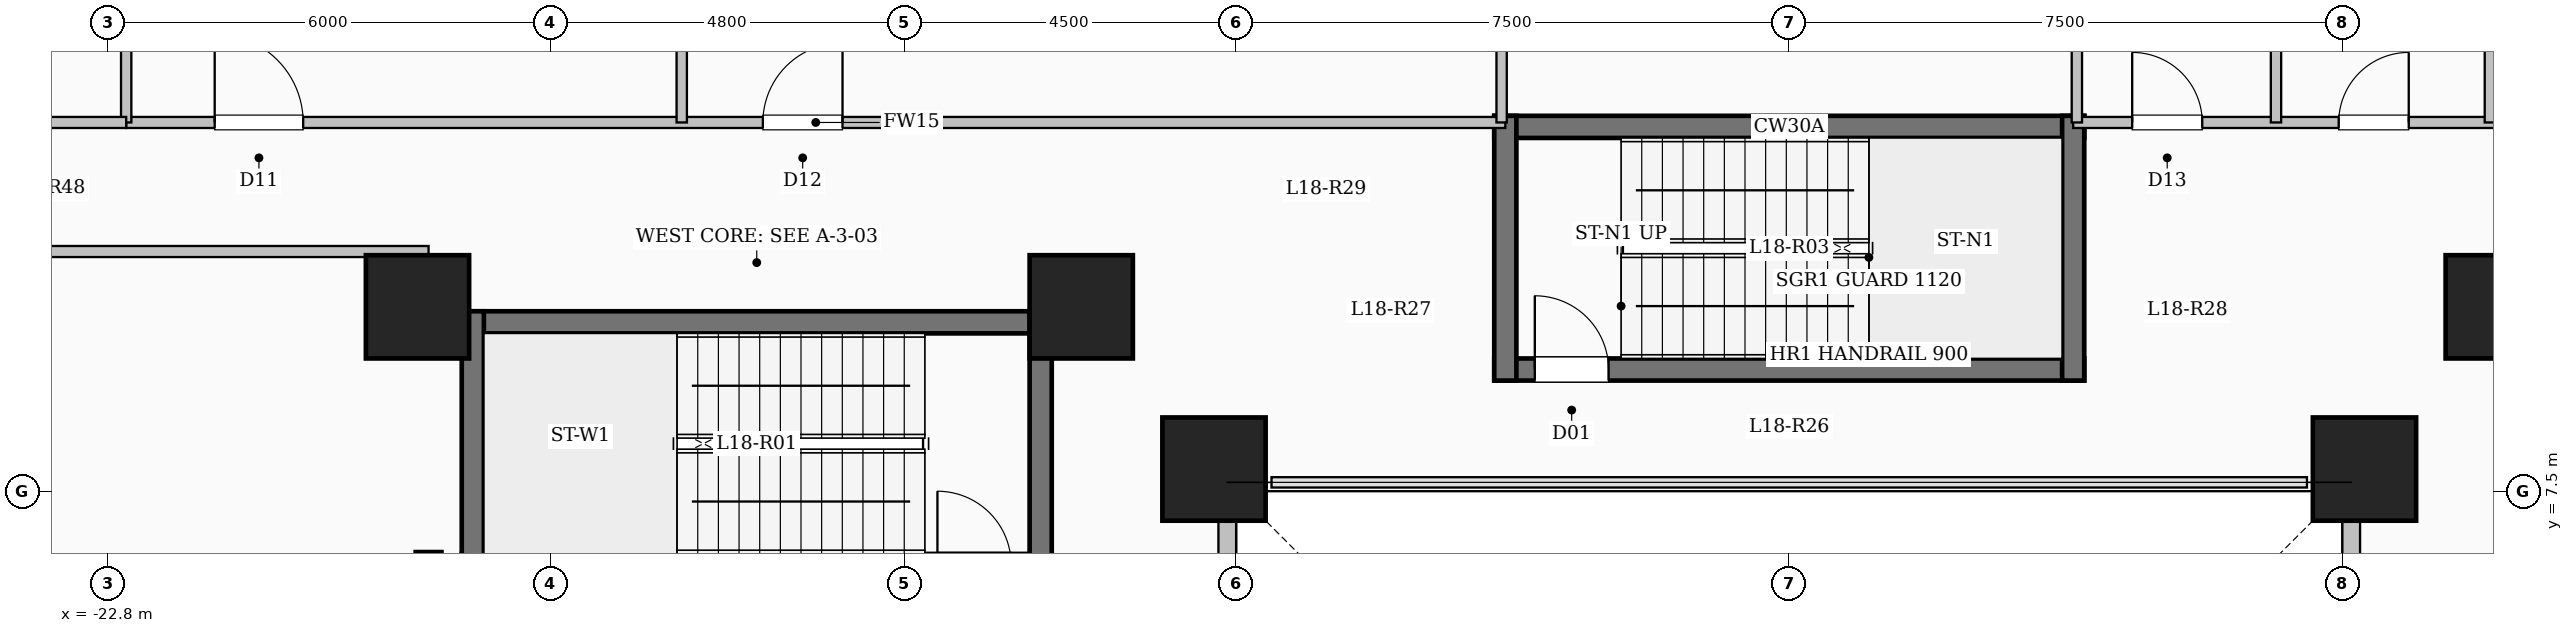
"""IFC4 building model, lengths in metres.
Left out: names, types, materials, properties, quantities, classifications, styles, units other than length and angle.
Written with IfcOpenShell. Run it as: python <this file> out.ifc"""

import sys

from ifc_helpers import new_model, si_unit, direction, frame, frame_2d, origin, origin_2d, place, context, subcontext, project, spatial, rectangle, extrude, element, fill, save


model = new_model("IFC4")
c1 = context("Model", 3, precision=1e-05, world=origin(), true_north=direction((0.0, 1.0)))
c2 = subcontext(c1, "Body", "Model", "MODEL_VIEW")
j1 = project(units=[si_unit("LENGTHUNIT", "METRE"), si_unit("PLANEANGLEUNIT", "RADIAN")], contexts=[c1])
p1 = place(None, origin())
s1 = spatial("IfcSite", under=j1, at=p1, CompositionType="ELEMENT")
p2 = place(p1, origin())
s2 = spatial("IfcBuilding", under=s1, at=p2, CompositionType="ELEMENT")
p3 = place(p2, frame((0.0, 0.0, 68.7)))
s3 = spatial("IfcBuildingStorey", under=s2, at=p3, CompositionType="ELEMENT", Elevation=68.7)
for number, where, z_axis, x_axis in (
    (1, (-7.8, 7.8, 0.0), (0.0, 0.0, 1.0), (1.0, 0.0, 0.0)),
    (2, (7.8, 7.8, 0.0), (0.0, 0.0, 1.0), (1.0, 0.0, 0.0)),
    (3, (-9.6, 10.0, 0.0), (0.0, 0.0, 1.0), (1.0, 0.0, 0.0)),
    (4, (9.6, 10.0, 0.0), (0.0, 0.0, 1.0), (1.0, 0.0, 0.0)),
    (5, (-18.6, 10.0, 0.0), (0.0, 0.0, 1.0), (1.0, 0.0, 0.0)),
):
    element("IfcColumn", number, at=place(p3, frame(where, z_axis=z_axis, x_axis=x_axis)), inside=s3, PredefinedType="COLUMN", context=c2, shape_type="SweptSolid", body=[
        extrude(rectangle(XDim=1.4, YDim=1.4, at=origin_2d()), origin(), (0.0, 0.0, 1.0), 4.5),
    ])
p4 = place(p3, frame((7.62, -7.62, 0.0), z_axis=(0.0, 0.0, 1.0), x_axis=(0.0, 1.0, 0.0)))
e6 = element("IfcWall", 6, at=p4, inside=s3, PredefinedType="SOLIDWALL", context=c2, shape_type="SweptSolid", body=[
    extrude(rectangle(XDim=15.24, YDim=0.24, at=frame_2d((7.62, 0.0))), origin(), (0.0, 0.0, 1.0), 4.2),
])
p5 = place(p4, frame((6.92, 0.0, 0.95)))
e7 = element("IfcOpeningElement", 7, at=p5, cuts=e6, PredefinedType="OPENING", context=c2, shape_type="SweptSolid", body=[
    extrude(rectangle(XDim=1.4, YDim=1.5, at=frame_2d((0.7, 0.75))), frame((0.0, 0.13, 0.0), z_axis=(0.0, -1.0, 0.0), x_axis=(1.0, 0.0, 0.0)), (0.0, 0.0, 1.0), 0.26),
])
p6 = place(p3, frame((-7.62, 7.62, 0.0), z_axis=(0.0, 0.0, 1.0), x_axis=(0.0, -1.0, 0.0)))
e8 = element("IfcWall", 8, at=p6, inside=s3, PredefinedType="SOLIDWALL", context=c2, shape_type="SweptSolid", body=[
    extrude(rectangle(XDim=15.24, YDim=0.24, at=frame_2d((7.62, 0.0))), origin(), (0.0, 0.0, 1.0), 4.2),
])
p7 = place(p6, frame((6.92, 0.0, 0.95)))
e9 = element("IfcOpeningElement", 9, at=p7, cuts=e8, PredefinedType="OPENING", context=c2, shape_type="SweptSolid", body=[
    extrude(rectangle(XDim=1.4, YDim=1.5, at=frame_2d((0.7, 0.75))), frame((0.0, 0.13, 0.0), z_axis=(0.0, -1.0, 0.0), x_axis=(1.0, 0.0, 0.0)), (0.0, 0.0, 1.0), 0.26),
])
p8 = place(p3, frame((-18.0, 9.79, 0.0), z_axis=(0.0, 0.0, 1.0), x_axis=(1.0, 0.0, 0.0)))
e10 = element("IfcWall", 10, at=p8, inside=s3, PredefinedType="SHEAR", context=c2, shape_type="SweptSolid", body=[
    extrude(rectangle(XDim=8.0, YDim=0.3, at=frame_2d((4.0, 0.0))), origin(), (0.0, 0.0, 1.0), 4.5),
])
p9 = place(p3, frame((-18.0, 6.5, 0.0), z_axis=(0.0, 0.0, 1.0), x_axis=(1.0, 0.0, 0.0)))
e11 = element("IfcWall", 11, at=p9, inside=s3, PredefinedType="SHEAR", context=c2, shape_type="SweptSolid", body=[
    extrude(rectangle(XDim=8.0, YDim=0.3, at=frame_2d((4.0, 0.0))), origin(), (0.0, 0.0, 1.0), 4.5),
])
p10 = place(p9, frame((6.45, 0.0, 0.0)))
e12 = element("IfcOpeningElement", 12, at=p10, cuts=e11, PredefinedType="OPENING", context=c2, shape_type="SweptSolid", body=[
    extrude(rectangle(XDim=1.0, YDim=2.15, at=frame_2d((0.5, 1.075))), frame((0.0, 0.16, 0.0), z_axis=(0.0, -1.0, 0.0), x_axis=(1.0, 0.0, 0.0)), (0.0, 0.0, 1.0), 0.32),
])
for number, where, z_axis, x_axis in (
    (13, (-17.85, 6.35, 0.0), (0.0, 0.0, 1.0), (0.0, 1.0, 0.0)),
    (14, (-10.15, 6.35, 0.0), (0.0, 0.0, 1.0), (0.0, 1.0, 0.0)),
):
    element("IfcWall", number, at=place(p3, frame(where, z_axis=z_axis, x_axis=x_axis)), inside=s3, PredefinedType="SHEAR", context=c2, shape_type="SweptSolid", body=[
        extrude(rectangle(XDim=3.59, YDim=0.3, at=frame_2d((1.795, 0.0))), origin(), (0.0, 0.0, 1.0), 4.5),
    ])
p11 = place(p3, frame((-4.0, 12.44, 0.0), z_axis=(0.0, 0.0, 1.0), x_axis=(1.0, 0.0, 0.0)))
e15 = element("IfcWall", 15, at=p11, inside=s3, PredefinedType="SHEAR", context=c2, shape_type="SweptSolid", body=[
    extrude(rectangle(XDim=8.0, YDim=0.3, at=frame_2d((4.0, 0.0))), origin(), (0.0, 0.0, 1.0), 4.5),
])
p12 = place(p3, frame((-4.0, 9.15, 0.0), z_axis=(0.0, 0.0, 1.0), x_axis=(1.0, 0.0, 0.0)))
e16 = element("IfcWall", 16, at=p12, inside=s3, PredefinedType="SHEAR", context=c2, shape_type="SweptSolid", body=[
    extrude(rectangle(XDim=8.0, YDim=0.3, at=frame_2d((4.0, 0.0))), origin(), (0.0, 0.0, 1.0), 4.5),
])
p13 = place(p12, frame((0.55, 0.0, 0.0)))
e17 = element("IfcOpeningElement", 17, at=p13, cuts=e16, PredefinedType="OPENING", context=c2, shape_type="SweptSolid", body=[
    extrude(rectangle(XDim=1.0, YDim=2.15, at=frame_2d((0.5, 1.075))), frame((0.0, 0.16, 0.0), z_axis=(0.0, -1.0, 0.0), x_axis=(1.0, 0.0, 0.0)), (0.0, 0.0, 1.0), 0.32),
])
for number, where, z_axis, x_axis in (
    (18, (-3.85, 9.0, 0.0), (0.0, 0.0, 1.0), (0.0, 1.0, 0.0)),
    (19, (3.85, 9.0, 0.0), (0.0, 0.0, 1.0), (0.0, 1.0, 0.0)),
):
    element("IfcWall", number, at=place(p3, frame(where, z_axis=z_axis, x_axis=x_axis)), inside=s3, PredefinedType="SHEAR", context=c2, shape_type="SweptSolid", body=[
        extrude(rectangle(XDim=3.59, YDim=0.3, at=frame_2d((1.795, 0.0))), origin(), (0.0, 0.0, 1.0), 4.5),
    ])
p14 = place(p3, frame((-18.45, -7.375, 0.0), z_axis=(0.0, 0.0, 1.0), x_axis=(0.0, 1.0, 0.0)))
e20 = element("IfcWall", 20, at=p14, inside=s3, PredefinedType="SHEAR", context=c2, shape_type="SweptSolid", body=[
    extrude(rectangle(XDim=14.05, YDim=0.35, at=frame_2d((7.025, 0.0))), origin(), (0.0, 0.0, 1.0), 4.5),
])
p15 = place(p3, frame((-22.55, 12.5, 0.0), z_axis=(0.0, 0.0, 1.0), x_axis=(1.0, 0.0, 0.0)))
e21 = element("IfcWall", 21, at=p15, inside=s3, PredefinedType="PARTITIONING", context=c2, shape_type="SweptSolid", body=[
    extrude(rectangle(XDim=18.7, YDim=0.15, at=frame_2d((9.35, 0.0))), origin(), (0.0, 0.0, 1.0), 4.2),
])
p16 = place(p15, frame((1.2, 0.0, 0.0)))
e22 = element("IfcOpeningElement", 22, at=p16, cuts=e21, PredefinedType="OPENING", context=c2, shape_type="SweptSolid", body=[
    extrude(rectangle(XDim=1.2, YDim=2.15, at=frame_2d((0.6, 1.075))), frame((0.0, 0.085, 0.0), z_axis=(0.0, -1.0, 0.0), x_axis=(1.0, 0.0, 0.0)), (0.0, 0.0, 1.0), 0.17),
])
p17 = place(p15, frame((8.633, 0.0, 0.0)))
e23 = element("IfcOpeningElement", 23, at=p17, cuts=e21, PredefinedType="OPENING", context=c2, shape_type="SweptSolid", body=[
    extrude(rectangle(XDim=1.08, YDim=2.15, at=frame_2d((0.54, 1.075))), frame((0.0, 0.085, 0.0), z_axis=(0.0, -1.0, 0.0), x_axis=(1.0, 0.0, 0.0)), (0.0, 0.0, 1.0), 0.17),
])
p18 = place(p3, frame((3.85, 12.5, 0.0), z_axis=(0.0, 0.0, 1.0), x_axis=(1.0, 0.0, 0.0)))
e24 = element("IfcWall", 24, at=p18, inside=s3, PredefinedType="PARTITIONING", context=c2, shape_type="SweptSolid", body=[
    extrude(rectangle(XDim=18.7, YDim=0.15, at=frame_2d((9.35, 0.0))), origin(), (0.0, 0.0, 1.0), 4.2),
])
p19 = place(p18, frame((0.8, 0.0, 0.0)))
e25 = element("IfcOpeningElement", 25, at=p19, cuts=e24, PredefinedType="OPENING", context=c2, shape_type="SweptSolid", body=[
    extrude(rectangle(XDim=0.95, YDim=2.15, at=frame_2d((0.475, 1.075))), frame((0.0, 0.085, 0.0), z_axis=(0.0, -1.0, 0.0), x_axis=(1.0, 0.0, 0.0)), (0.0, 0.0, 1.0), 0.17),
])
p20 = place(p18, frame((3.6, 0.0, 0.0)))
e26 = element("IfcOpeningElement", 26, at=p20, cuts=e24, PredefinedType="OPENING", context=c2, shape_type="SweptSolid", body=[
    extrude(rectangle(XDim=0.95, YDim=2.15, at=frame_2d((0.475, 1.075))), frame((0.0, 0.085, 0.0), z_axis=(0.0, -1.0, 0.0), x_axis=(1.0, 0.0, 0.0)), (0.0, 0.0, 1.0), 0.17),
])
p21 = place(p18, frame((6.55, 0.0, 0.0)))
e27 = element("IfcOpeningElement", 27, at=p21, cuts=e24, PredefinedType="OPENING", context=c2, shape_type="SweptSolid", body=[
    extrude(rectangle(XDim=1.08, YDim=2.15, at=frame_2d((0.54, 1.075))), frame((0.0, 0.085, 0.0), z_axis=(0.0, -1.0, 0.0), x_axis=(1.0, 0.0, 0.0)), (0.0, 0.0, 1.0), 0.17),
])
p22 = place(p18, frame((11.97, 0.0, 0.0)))
e28 = element("IfcOpeningElement", 28, at=p22, cuts=e24, PredefinedType="OPENING", context=c2, shape_type="SweptSolid", body=[
    extrude(rectangle(XDim=1.2, YDim=2.15, at=frame_2d((0.6, 1.075))), frame((0.0, 0.085, 0.0), z_axis=(0.0, -1.0, 0.0), x_axis=(1.0, 0.0, 0.0)), (0.0, 0.0, 1.0), 0.17),
])
for number, where, z_axis, x_axis in (
    (29, (-3.9, 12.5, 0.0), (0.0, 0.0, 1.0), (0.0, 1.0, 0.0)),
    (30, (3.9, 12.5, 0.0), (0.0, 0.0, 1.0), (0.0, 1.0, 0.0)),
):
    element("IfcWall", number, at=place(p3, frame(where, z_axis=z_axis, x_axis=x_axis)), inside=s3, PredefinedType="PARTITIONING", context=c2, shape_type="SweptSolid", body=[
        extrude(rectangle(XDim=12.58, YDim=0.14, at=frame_2d((6.29, 0.0))), origin(), (0.0, 0.0, 1.0), 4.2),
    ])
p23 = place(p3, frame((-15.017, 12.5, 0.0), z_axis=(0.0, 0.0, 1.0), x_axis=(0.0, 1.0, 0.0)))
e31 = element("IfcWall", 31, at=p23, inside=s3, PredefinedType="PARTITIONING", context=c2, shape_type="SweptSolid", body=[
    extrude(rectangle(XDim=11.1, YDim=0.14, at=frame_2d((5.55, 0.0))), origin(), (0.0, 0.0, 1.0), 3.535),
])
p24 = place(p3, frame((6.6, 12.5, 0.0), z_axis=(0.0, 0.0, 1.0), x_axis=(0.0, 1.0, 0.0)))
e32 = element("IfcWall", 32, at=p24, inside=s3, PredefinedType="PARTITIONING", context=c2, shape_type="SweptSolid", body=[
    extrude(rectangle(XDim=12.185, YDim=0.14, at=frame_2d((6.093, 0.0))), origin(), (0.0, 0.0, 1.0), 4.2),
])
p25 = place(p3, frame((9.5, 12.5, 0.0), z_axis=(0.0, 0.0, 1.0), x_axis=(0.0, 1.0, 0.0)))
e33 = element("IfcWall", 33, at=p25, inside=s3, PredefinedType="PARTITIONING", context=c2, shape_type="SweptSolid", body=[
    extrude(rectangle(XDim=11.47, YDim=0.14, at=frame_2d((5.735, 0.0))), origin(), (0.0, 0.0, 1.0), 4.2),
])
p26 = place(p3, frame((-28.68, 10.75, 0.0), z_axis=(0.0, 0.0, 1.0), x_axis=(1.0, 0.0, 0.0)))
e34 = element("IfcWall", 34, at=p26, inside=s3, PredefinedType="PARTITIONING", context=c2, shape_type="SweptSolid", body=[
    extrude(rectangle(XDim=10.23, YDim=0.15, at=frame_2d((5.115, 0.0))), origin(), (0.0, 0.0, 1.0), 4.2),
])
p27 = place(p3, frame((-22.55, 12.5, 0.0), z_axis=(0.0, 0.0, 1.0), x_axis=(0.0, 1.0, 0.0)))
e35 = element("IfcWall", 35, at=p27, inside=s3, PredefinedType="PARTITIONING", context=c2, shape_type="SweptSolid", body=[
    extrude(rectangle(XDim=6.55, YDim=0.14, at=frame_2d((3.275, 0.0))), origin(), (0.0, 0.0, 1.0), 4.2),
])
p28 = place(p3, frame((-28.68, 12.5, 0.0), z_axis=(0.0, 0.0, 1.0), x_axis=(1.0, 0.0, 0.0)))
e36 = element("IfcWall", 36, at=p28, inside=s3, PredefinedType="PARTITIONING", context=c2, shape_type="SweptSolid", body=[
    extrude(rectangle(XDim=6.13, YDim=0.15, at=frame_2d((3.065, 0.0))), origin(), (0.0, 0.0, 1.0), 4.2),
])
p29 = place(p28, frame((2.59, 0.0, 0.0)))
e37 = element("IfcOpeningElement", 37, at=p29, cuts=e36, PredefinedType="OPENING", context=c2, shape_type="SweptSolid", body=[
    extrude(rectangle(XDim=0.95, YDim=2.15, at=frame_2d((0.475, 1.075))), frame((0.0, 0.085, 0.0), z_axis=(0.0, -1.0, 0.0), x_axis=(1.0, 0.0, 0.0)), (0.0, 0.0, 1.0), 0.17),
])
p30 = place(p13, origin())
e38 = element("IfcDoor", 38, at=p30, inside=s3, OperationType="SINGLE_SWING_LEFT", PredefinedType="DOOR", context=c2, shape_type="SweptSolid", body=[
    extrude(rectangle(XDim=1.0, YDim=2.15, at=frame_2d((0.5, 1.075))), frame((0.0, 0.025, 0.0), z_axis=(0.0, -1.0, 0.0), x_axis=(1.0, 0.0, 0.0)), (0.0, 0.0, 1.0), 0.05),
])
fill(e17, e38)
p31 = place(p16, origin())
e39 = element("IfcDoor", 39, at=p31, inside=s3, OperationType="SINGLE_SWING_LEFT", PredefinedType="DOOR", context=c2, shape_type="SweptSolid", body=[
    extrude(rectangle(XDim=1.2, YDim=2.15, at=frame_2d((0.6, 1.075))), frame((0.0, 0.025, 0.0), z_axis=(0.0, -1.0, 0.0), x_axis=(1.0, 0.0, 0.0)), (0.0, 0.0, 1.0), 0.05),
])
fill(e22, e39)
p32 = place(p17, origin())
e40 = element("IfcDoor", 40, at=p32, inside=s3, OperationType="SINGLE_SWING_RIGHT", PredefinedType="DOOR", context=c2, shape_type="SweptSolid", body=[
    extrude(rectangle(XDim=1.08, YDim=2.15, at=frame_2d((0.54, 1.075))), frame((0.0, 0.025, 0.0), z_axis=(0.0, -1.0, 0.0), x_axis=(1.0, 0.0, 0.0)), (0.0, 0.0, 1.0), 0.05),
])
fill(e23, e40)
p33 = place(p19, origin())
e41 = element("IfcDoor", 41, at=p33, inside=s3, OperationType="SINGLE_SWING_LEFT", PredefinedType="DOOR", context=c2, shape_type="SweptSolid", body=[
    extrude(rectangle(XDim=0.95, YDim=2.15, at=frame_2d((0.475, 1.075))), frame((0.0, 0.025, 0.0), z_axis=(0.0, -1.0, 0.0), x_axis=(1.0, 0.0, 0.0)), (0.0, 0.0, 1.0), 0.05),
])
fill(e25, e41)
p34 = place(p20, origin())
e42 = element("IfcDoor", 42, at=p34, inside=s3, OperationType="SINGLE_SWING_RIGHT", PredefinedType="DOOR", context=c2, shape_type="SweptSolid", body=[
    extrude(rectangle(XDim=0.95, YDim=2.15, at=frame_2d((0.475, 1.075))), frame((0.0, 0.025, 0.0), z_axis=(0.0, -1.0, 0.0), x_axis=(1.0, 0.0, 0.0)), (0.0, 0.0, 1.0), 0.05),
])
fill(e26, e42)
save(model, sys.argv[1])
